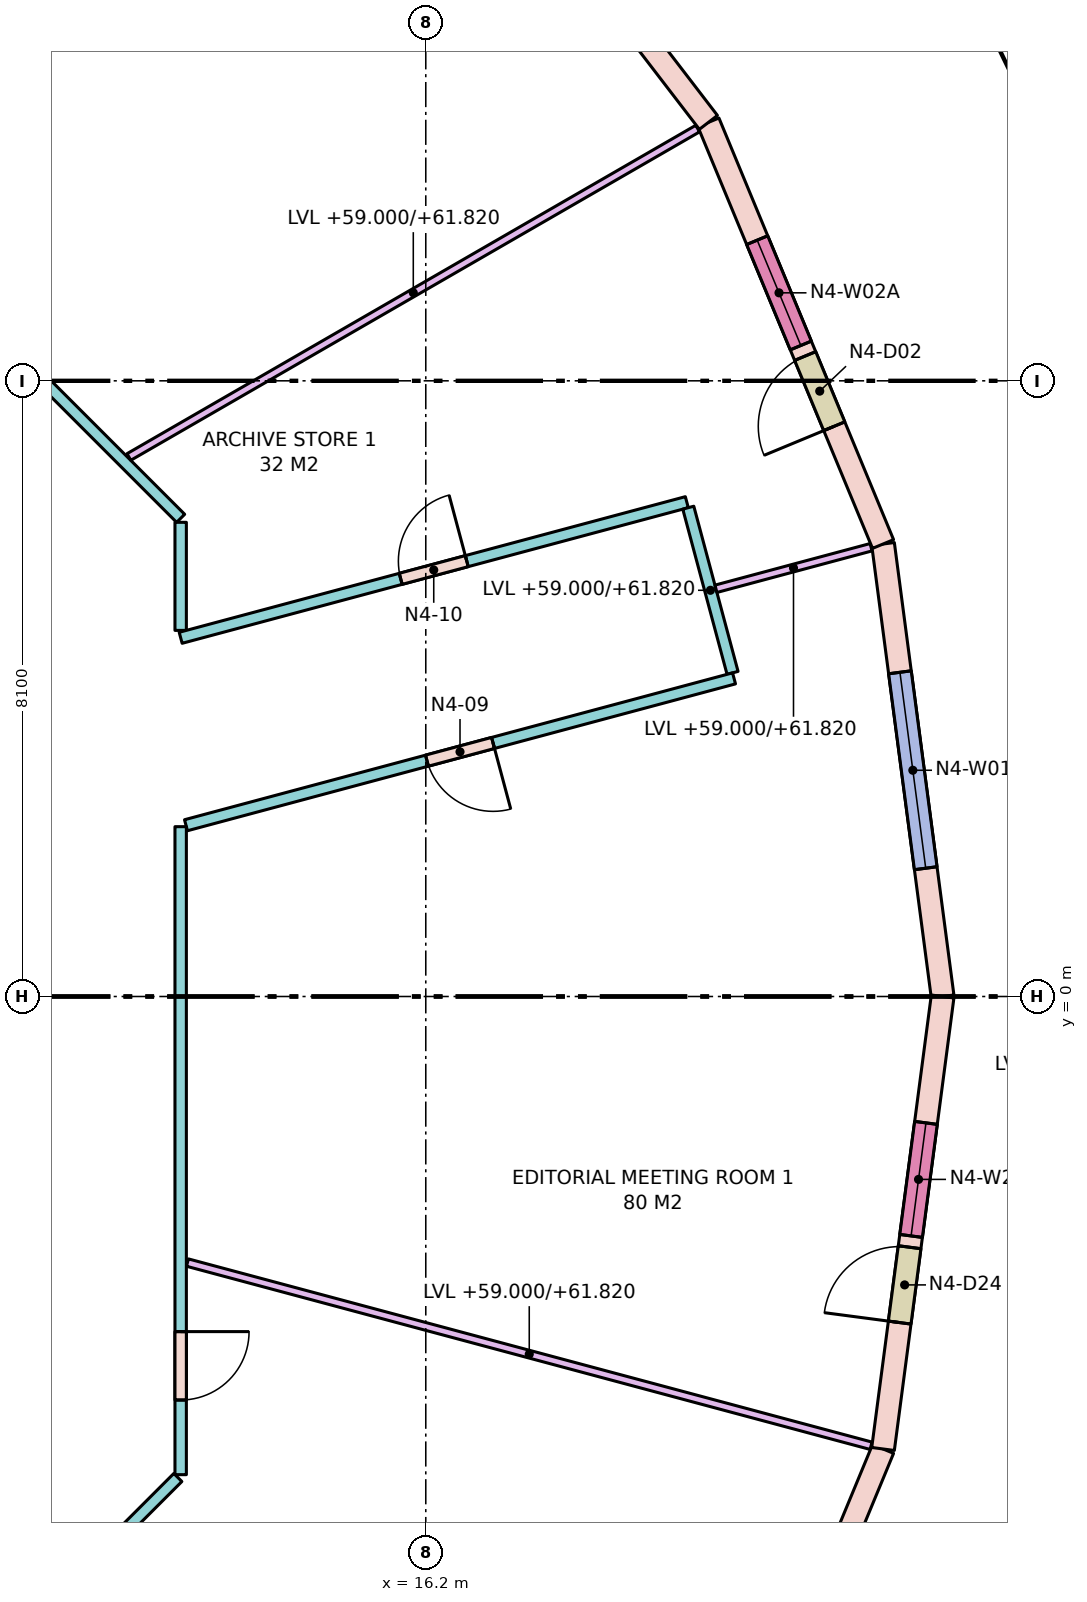
"""IFC4 building model, lengths in metres.
Left out: names, types, materials, properties, quantities, classifications, styles, units other than length and angle.
Written with IfcOpenShell. Run it as: python <this file> out.ifc"""

import sys

from ifc_helpers import new_model, si_unit, direction, frame, frame_2d, origin, place, context, subcontext, project, spatial, rectangle, extrude, element, fill, save


model = new_model("IFC4")
c1 = context("Model", 3, precision=1e-05, world=origin(), true_north=direction((0.0, 1.0)))
c2 = subcontext(c1, "Body", "Model", "MODEL_VIEW")
j1 = project(units=[si_unit("LENGTHUNIT", "METRE"), si_unit("PLANEANGLEUNIT", "RADIAN")], contexts=[c1])
p1 = place(None, origin())
s1 = spatial("IfcSite", under=j1, at=p1, CompositionType="ELEMENT")
p2 = place(p1, origin())
s2 = spatial("IfcBuilding", under=s1, at=p2, CompositionType="ELEMENT")
p3 = place(p2, frame((0.0, 0.0, 59.0)))
s3 = spatial("IfcBuildingStorey", under=s2, at=p3, CompositionType="ELEMENT", Elevation=59.0)
p4 = place(p3, frame((23.0, 0.0, 0.0), z_axis=(0.0, 0.0, 1.0), x_axis=(-0.130522880875, 0.991445297315, 0.0)))
e1 = element("IfcWall", 1, at=p4, inside=s3, PredefinedType="STANDARD", context=c2, shape_type="SweptSolid", body=[
    extrude(rectangle(XDim=6.004, YDim=0.3, at=frame_2d((3.002, 0.0))), origin(), (0.0, 0.0, 1.0), 3.72),
])
p5 = place(p4, frame((1.702, 0.0, 0.8)))
e2 = element("IfcOpeningElement", 2, at=p5, cuts=e1, PredefinedType="OPENING", context=c2, shape_type="SweptSolid", body=[
    extrude(rectangle(XDim=2.6, YDim=2.7, at=frame_2d((1.3, 1.35))), frame((0.0, 0.16, 0.0), z_axis=(0.0, -1.0, 0.0), x_axis=(1.0, 0.0, 0.0)), (0.0, 0.0, 1.0), 0.32),
])
p6 = place(p3, frame((22.216, 5.953, 0.0), z_axis=(0.0, 0.0, 1.0), x_axis=(-0.382671411433, 0.923884511653, 0.0)))
e3 = element("IfcWall", 3, at=p6, inside=s3, PredefinedType="STANDARD", context=c2, shape_type="SweptSolid", body=[
    extrude(rectangle(XDim=6.004, YDim=0.3, at=frame_2d((3.002, 0.0))), origin(), (0.0, 0.0, 1.0), 3.72),
])
p7 = place(p6, frame((1.677, 0.0, 0.0)))
e4 = element("IfcOpeningElement", 4, at=p7, cuts=e3, PredefinedType="OPENING", context=c2, shape_type="SweptSolid", body=[
    extrude(rectangle(XDim=1.0, YDim=2.4, at=frame_2d((0.5, 1.2))), frame((0.0, 0.16, 0.0), z_axis=(0.0, -1.0, 0.0), x_axis=(1.0, 0.0, 0.0)), (0.0, 0.0, 1.0), 0.32),
])
p8 = place(p6, frame((2.827, 0.0, 0.8)))
e5 = element("IfcOpeningElement", 5, at=p8, cuts=e3, PredefinedType="OPENING", context=c2, shape_type="SweptSolid", body=[
    extrude(rectangle(XDim=1.5, YDim=2.7, at=frame_2d((0.75, 1.35))), frame((0.0, 0.16, 0.0), z_axis=(0.0, -1.0, 0.0), x_axis=(1.0, 0.0, 0.0)), (0.0, 0.0, 1.0), 0.32),
])
p9 = place(p3, frame((19.919, 11.5, 0.0), z_axis=(0.0, 0.0, 1.0), x_axis=(-0.608778912074, 0.793339924758, 0.0)))
e6 = element("IfcWall", 6, at=p9, inside=s3, PredefinedType="STANDARD", context=c2, shape_type="SweptSolid", body=[
    extrude(rectangle(XDim=6.004, YDim=0.3, at=frame_2d((3.002, 0.0))), origin(), (0.0, 0.0, 1.0), 3.72),
])
p10 = place(p9, frame((1.702, 0.0, 0.8)))
e7 = element("IfcOpeningElement", 7, at=p10, cuts=e6, PredefinedType="OPENING", context=c2, shape_type="SweptSolid", body=[
    extrude(rectangle(XDim=2.6, YDim=2.7, at=frame_2d((1.3, 1.35))), frame((0.0, 0.16, 0.0), z_axis=(0.0, -1.0, 0.0), x_axis=(1.0, 0.0, 0.0)), (0.0, 0.0, 1.0), 0.32),
])
p11 = place(p3, frame((19.919, -11.5, 0.0), z_axis=(0.0, 0.0, 1.0), x_axis=(0.382671411433, 0.923884511653, 0.0)))
e8 = element("IfcWall", 8, at=p11, inside=s3, PredefinedType="STANDARD", context=c2, shape_type="SweptSolid", body=[
    extrude(rectangle(XDim=6.004, YDim=0.3, at=frame_2d((3.002, 0.0))), origin(), (0.0, 0.0, 1.0), 3.72),
])
p12 = place(p11, frame((1.702, 0.0, 0.8)))
e9 = element("IfcOpeningElement", 9, at=p12, cuts=e8, PredefinedType="OPENING", context=c2, shape_type="SweptSolid", body=[
    extrude(rectangle(XDim=2.6, YDim=2.7, at=frame_2d((1.3, 1.35))), frame((0.0, 0.16, 0.0), z_axis=(0.0, -1.0, 0.0), x_axis=(1.0, 0.0, 0.0)), (0.0, 0.0, 1.0), 0.32),
])
p13 = place(p3, frame((22.216, -5.953, 0.0), z_axis=(0.0, 0.0, 1.0), x_axis=(0.130522880875, 0.991445297315, 0.0)))
e10 = element("IfcWall", 10, at=p13, inside=s3, PredefinedType="STANDARD", context=c2, shape_type="SweptSolid", body=[
    extrude(rectangle(XDim=6.004, YDim=0.3, at=frame_2d((3.002, 0.0))), origin(), (0.0, 0.0, 1.0), 3.72),
])
p14 = place(p13, frame((1.677, 0.0, 0.0)))
e11 = element("IfcOpeningElement", 11, at=p14, cuts=e10, PredefinedType="OPENING", context=c2, shape_type="SweptSolid", body=[
    extrude(rectangle(XDim=1.0, YDim=2.4, at=frame_2d((0.5, 1.2))), frame((0.0, 0.16, 0.0), z_axis=(0.0, -1.0, 0.0), x_axis=(1.0, 0.0, 0.0)), (0.0, 0.0, 1.0), 0.32),
])
p15 = place(p13, frame((2.827, 0.0, 0.8)))
e12 = element("IfcOpeningElement", 12, at=p15, cuts=e10, PredefinedType="OPENING", context=c2, shape_type="SweptSolid", body=[
    extrude(rectangle(XDim=1.5, YDim=2.7, at=frame_2d((0.75, 1.35))), frame((0.0, 0.16, 0.0), z_axis=(0.0, -1.0, 0.0), x_axis=(1.0, 0.0, 0.0)), (0.0, 0.0, 1.0), 0.32),
])
p16 = place(p3, frame((8.328, 10.938, 0.0), z_axis=(0.0, 0.0, 1.0), x_axis=(0.707125355289, -0.707088206597, 0.0)))
e13 = element("IfcWall", 13, at=p16, inside=s3, PredefinedType="PARTITIONING", context=c2, shape_type="SweptSolid", body=[
    extrude(rectangle(XDim=6.572, YDim=0.15, at=frame_2d((3.286, 0.0))), origin(), (0.0, 0.0, 1.0), 2.82),
])
p17 = place(p3, frame((12.975, 6.238, 0.0), z_axis=(0.0, 0.0, 1.0), x_axis=(0.0, -1.0, 0.0)))
e14 = element("IfcWall", 14, at=p17, inside=s3, PredefinedType="PARTITIONING", context=c2, shape_type="SweptSolid", body=[
    extrude(rectangle(XDim=1.422, YDim=0.15, at=frame_2d((0.711, 0.0))), origin(), (0.0, 0.0, 1.0), 3.72),
])
p18 = place(p3, frame((12.975, 4.719, 0.0), z_axis=(0.0, 0.0, 1.0), x_axis=(0.965924499418, 0.258823997003, 0.0)))
e15 = element("IfcWall", 15, at=p18, inside=s3, PredefinedType="PARTITIONING", context=c2, shape_type="SweptSolid", body=[
    extrude(rectangle(XDim=6.894, YDim=0.15, at=frame_2d((3.447, 0.0))), origin(), (0.0, 0.0, 1.0), 3.72),
])
p19 = place(p18, frame((2.997, 0.0, 0.0)))
e16 = element("IfcOpeningElement", 16, at=p19, cuts=e15, PredefinedType="OPENING", context=c2, shape_type="SweptSolid", body=[
    extrude(rectangle(XDim=0.9, YDim=2.1, at=frame_2d((0.45, 1.05))), frame((0.0, 0.085, 0.0), z_axis=(0.0, -1.0, 0.0), x_axis=(1.0, 0.0, 0.0)), (0.0, 0.0, 1.0), 0.17),
])
p20 = place(p3, frame((19.654, 6.431, 0.0), z_axis=(0.0, 0.0, 1.0), x_axis=(0.258891558609, -0.965906393436, 0.0)))
e17 = element("IfcWall", 17, at=p20, inside=s3, PredefinedType="PARTITIONING", context=c2, shape_type="SweptSolid", body=[
    extrude(rectangle(XDim=2.25, YDim=0.15, at=frame_2d((1.125, 0.0))), origin(), (0.0, 0.0, 1.0), 2.82),
])
p21 = place(p3, frame((20.256, 4.185, 0.0), z_axis=(0.0, 0.0, 1.0), x_axis=(-0.965924840231, -0.258822725092, 0.0)))
e18 = element("IfcWall", 18, at=p21, inside=s3, PredefinedType="PARTITIONING", context=c2, shape_type="SweptSolid", body=[
    extrude(rectangle(XDim=7.465, YDim=0.15, at=frame_2d((3.732, 0.0))), origin(), (0.0, 0.0, 1.0), 3.72),
])
p22 = place(p21, frame((3.282, 0.0, 0.0)))
e19 = element("IfcOpeningElement", 19, at=p22, cuts=e18, PredefinedType="OPENING", context=c2, shape_type="SweptSolid", body=[
    extrude(rectangle(XDim=0.9, YDim=2.1, at=frame_2d((0.45, 1.05))), frame((0.0, 0.085, 0.0), z_axis=(0.0, -1.0, 0.0), x_axis=(1.0, 0.0, 0.0)), (0.0, 0.0, 1.0), 0.17),
])
p23 = place(p3, frame((12.975, 2.234, 0.0), z_axis=(0.0, 0.0, 1.0), x_axis=(0.0, -1.0, 0.0)))
e20 = element("IfcWall", 20, at=p23, inside=s3, PredefinedType="PARTITIONING", context=c2, shape_type="SweptSolid", body=[
    extrude(rectangle(XDim=8.525, YDim=0.15, at=frame_2d((4.263, 0.0))), origin(), (0.0, 0.0, 1.0), 2.82),
])
p24 = place(p23, frame((6.643, 0.0, 0.0)))
e21 = element("IfcOpeningElement", 21, at=p24, cuts=e20, PredefinedType="OPENING", context=c2, shape_type="SweptSolid", body=[
    extrude(rectangle(XDim=0.9, YDim=2.1, at=frame_2d((0.45, 1.05))), frame((0.0, 0.085, 0.0), z_axis=(0.0, -1.0, 0.0), x_axis=(1.0, 0.0, 0.0)), (0.0, 0.0, 1.0), 0.17),
])
p25 = place(p3, frame((12.938, -6.328, 0.0), z_axis=(0.0, 0.0, 1.0), x_axis=(-0.707088206597, -0.707125355289, 0.0)))
e22 = element("IfcWall", 22, at=p25, inside=s3, PredefinedType="PARTITIONING", context=c2, shape_type="SweptSolid", body=[
    extrude(rectangle(XDim=6.572, YDim=0.15, at=frame_2d((3.286, 0.0))), origin(), (0.0, 0.0, 1.0), 2.82),
])
p26 = place(p25, frame((2.398, 0.0, 0.0)))
e23 = element("IfcOpeningElement", 23, at=p26, cuts=e22, PredefinedType="OPENING", context=c2, shape_type="SweptSolid", body=[
    extrude(rectangle(XDim=0.9, YDim=2.1, at=frame_2d((0.45, 1.05))), frame((0.0, 0.085, 0.0), z_axis=(0.0, -1.0, 0.0), x_axis=(1.0, 0.0, 0.0)), (0.0, 0.0, 1.0), 0.17),
])
p27 = place(p3, frame((20.018, 5.364, 0.0), z_axis=(0.0, 0.0, 1.0), x_axis=(0.965927422152, 0.258813089189, 0.0)))
e24 = element("IfcWall", 24, at=p27, inside=s3, PredefinedType="PARTITIONING", context=c2, shape_type="SweptSolid", body=[
    extrude(rectangle(XDim=2.113, YDim=0.1, at=frame_2d((1.057, 0.0))), origin(), (0.0, 0.0, 1.0), 2.82),
])
p28 = place(p3, frame((12.294, 7.098, 0.0), z_axis=(0.0, 0.0, 1.0), x_axis=(0.866010547425, 0.500025731086, 0.0)))
e25 = element("IfcWall", 25, at=p28, inside=s3, PredefinedType="PARTITIONING", context=c2, shape_type="SweptSolid", body=[
    extrude(rectangle(XDim=8.641, YDim=0.1, at=frame_2d((4.32, 0.0))), origin(), (0.0, 0.0, 1.0), 2.82),
])
p29 = place(p3, frame((13.064, -3.5, 0.0), z_axis=(0.0, 0.0, 1.0), x_axis=(0.965922655056, -0.258830880017, 0.0)))
e26 = element("IfcWall", 26, at=p29, inside=s3, PredefinedType="PARTITIONING", context=c2, shape_type="SweptSolid", body=[
    extrude(rectangle(XDim=9.312, YDim=0.1, at=frame_2d((4.656, 0.0))), origin(), (0.0, 0.0, 1.0), 2.82),
])
p30 = place(p5, origin())
e27 = element("IfcWindow", 27, at=p30, inside=s3, PartitioningType="SINGLE_PANEL", PredefinedType="WINDOW", context=c2, shape_type="SweptSolid", body=[
    extrude(rectangle(XDim=2.6, YDim=2.7, at=frame_2d((1.3, 1.35))), frame((0.0, 0.03, 0.0), z_axis=(0.0, -1.0, 0.0), x_axis=(1.0, 0.0, 0.0)), (0.0, 0.0, 1.0), 0.06),
])
fill(e2, e27)
p31 = place(p7, origin())
e28 = element("IfcDoor", 28, at=p31, inside=s3, OperationType="SINGLE_SWING_LEFT", PredefinedType="DOOR", context=c2, shape_type="SweptSolid", body=[
    extrude(rectangle(XDim=1.0, YDim=2.4, at=frame_2d((0.5, 1.2))), frame((0.0, 0.025, 0.0), z_axis=(0.0, -1.0, 0.0), x_axis=(1.0, 0.0, 0.0)), (0.0, 0.0, 1.0), 0.05),
])
fill(e4, e28)
p32 = place(p8, origin())
e29 = element("IfcWindow", 29, at=p32, inside=s3, PartitioningType="SINGLE_PANEL", PredefinedType="WINDOW", context=c2, shape_type="SweptSolid", body=[
    extrude(rectangle(XDim=1.5, YDim=2.7, at=frame_2d((0.75, 1.35))), frame((0.0, 0.03, 0.0), z_axis=(0.0, -1.0, 0.0), x_axis=(1.0, 0.0, 0.0)), (0.0, 0.0, 1.0), 0.06),
])
fill(e5, e29)
p33 = place(p14, origin())
e30 = element("IfcDoor", 30, at=p33, inside=s3, OperationType="SINGLE_SWING_LEFT", PredefinedType="DOOR", context=c2, shape_type="SweptSolid", body=[
    extrude(rectangle(XDim=1.0, YDim=2.4, at=frame_2d((0.5, 1.2))), frame((0.0, 0.025, 0.0), z_axis=(0.0, -1.0, 0.0), x_axis=(1.0, 0.0, 0.0)), (0.0, 0.0, 1.0), 0.05),
])
fill(e11, e30)
p34 = place(p15, origin())
e31 = element("IfcWindow", 31, at=p34, inside=s3, PartitioningType="SINGLE_PANEL", PredefinedType="WINDOW", context=c2, shape_type="SweptSolid", body=[
    extrude(rectangle(XDim=1.5, YDim=2.7, at=frame_2d((0.75, 1.35))), frame((0.0, 0.03, 0.0), z_axis=(0.0, -1.0, 0.0), x_axis=(1.0, 0.0, 0.0)), (0.0, 0.0, 1.0), 0.06),
])
fill(e12, e31)
p35 = place(p24, origin())
e32 = element("IfcDoor", 32, at=p35, inside=s3, OperationType="SINGLE_SWING_LEFT", PredefinedType="DOOR", context=c2, shape_type="SweptSolid", body=[
    extrude(rectangle(XDim=0.9, YDim=2.1, at=frame_2d((0.45, 1.05))), frame((0.0, 0.025, 0.0), z_axis=(0.0, -1.0, 0.0), x_axis=(1.0, 0.0, 0.0)), (0.0, 0.0, 1.0), 0.05),
])
fill(e21, e32)
p36 = place(p22, origin())
e33 = element("IfcDoor", 33, at=p36, inside=s3, OperationType="SINGLE_SWING_LEFT", PredefinedType="DOOR", context=c2, shape_type="SweptSolid", body=[
    extrude(rectangle(XDim=0.9, YDim=2.1, at=frame_2d((0.45, 1.05))), frame((0.0, 0.025, 0.0), z_axis=(0.0, -1.0, 0.0), x_axis=(1.0, 0.0, 0.0)), (0.0, 0.0, 1.0), 0.05),
])
fill(e19, e33)
p37 = place(p19, origin())
e34 = element("IfcDoor", 34, at=p37, inside=s3, OperationType="SINGLE_SWING_RIGHT", PredefinedType="DOOR", context=c2, shape_type="SweptSolid", body=[
    extrude(rectangle(XDim=0.9, YDim=2.1, at=frame_2d((0.45, 1.05))), frame((0.0, 0.025, 0.0), z_axis=(0.0, -1.0, 0.0), x_axis=(1.0, 0.0, 0.0)), (0.0, 0.0, 1.0), 0.05),
])
fill(e16, e34)
save(model, sys.argv[1])
